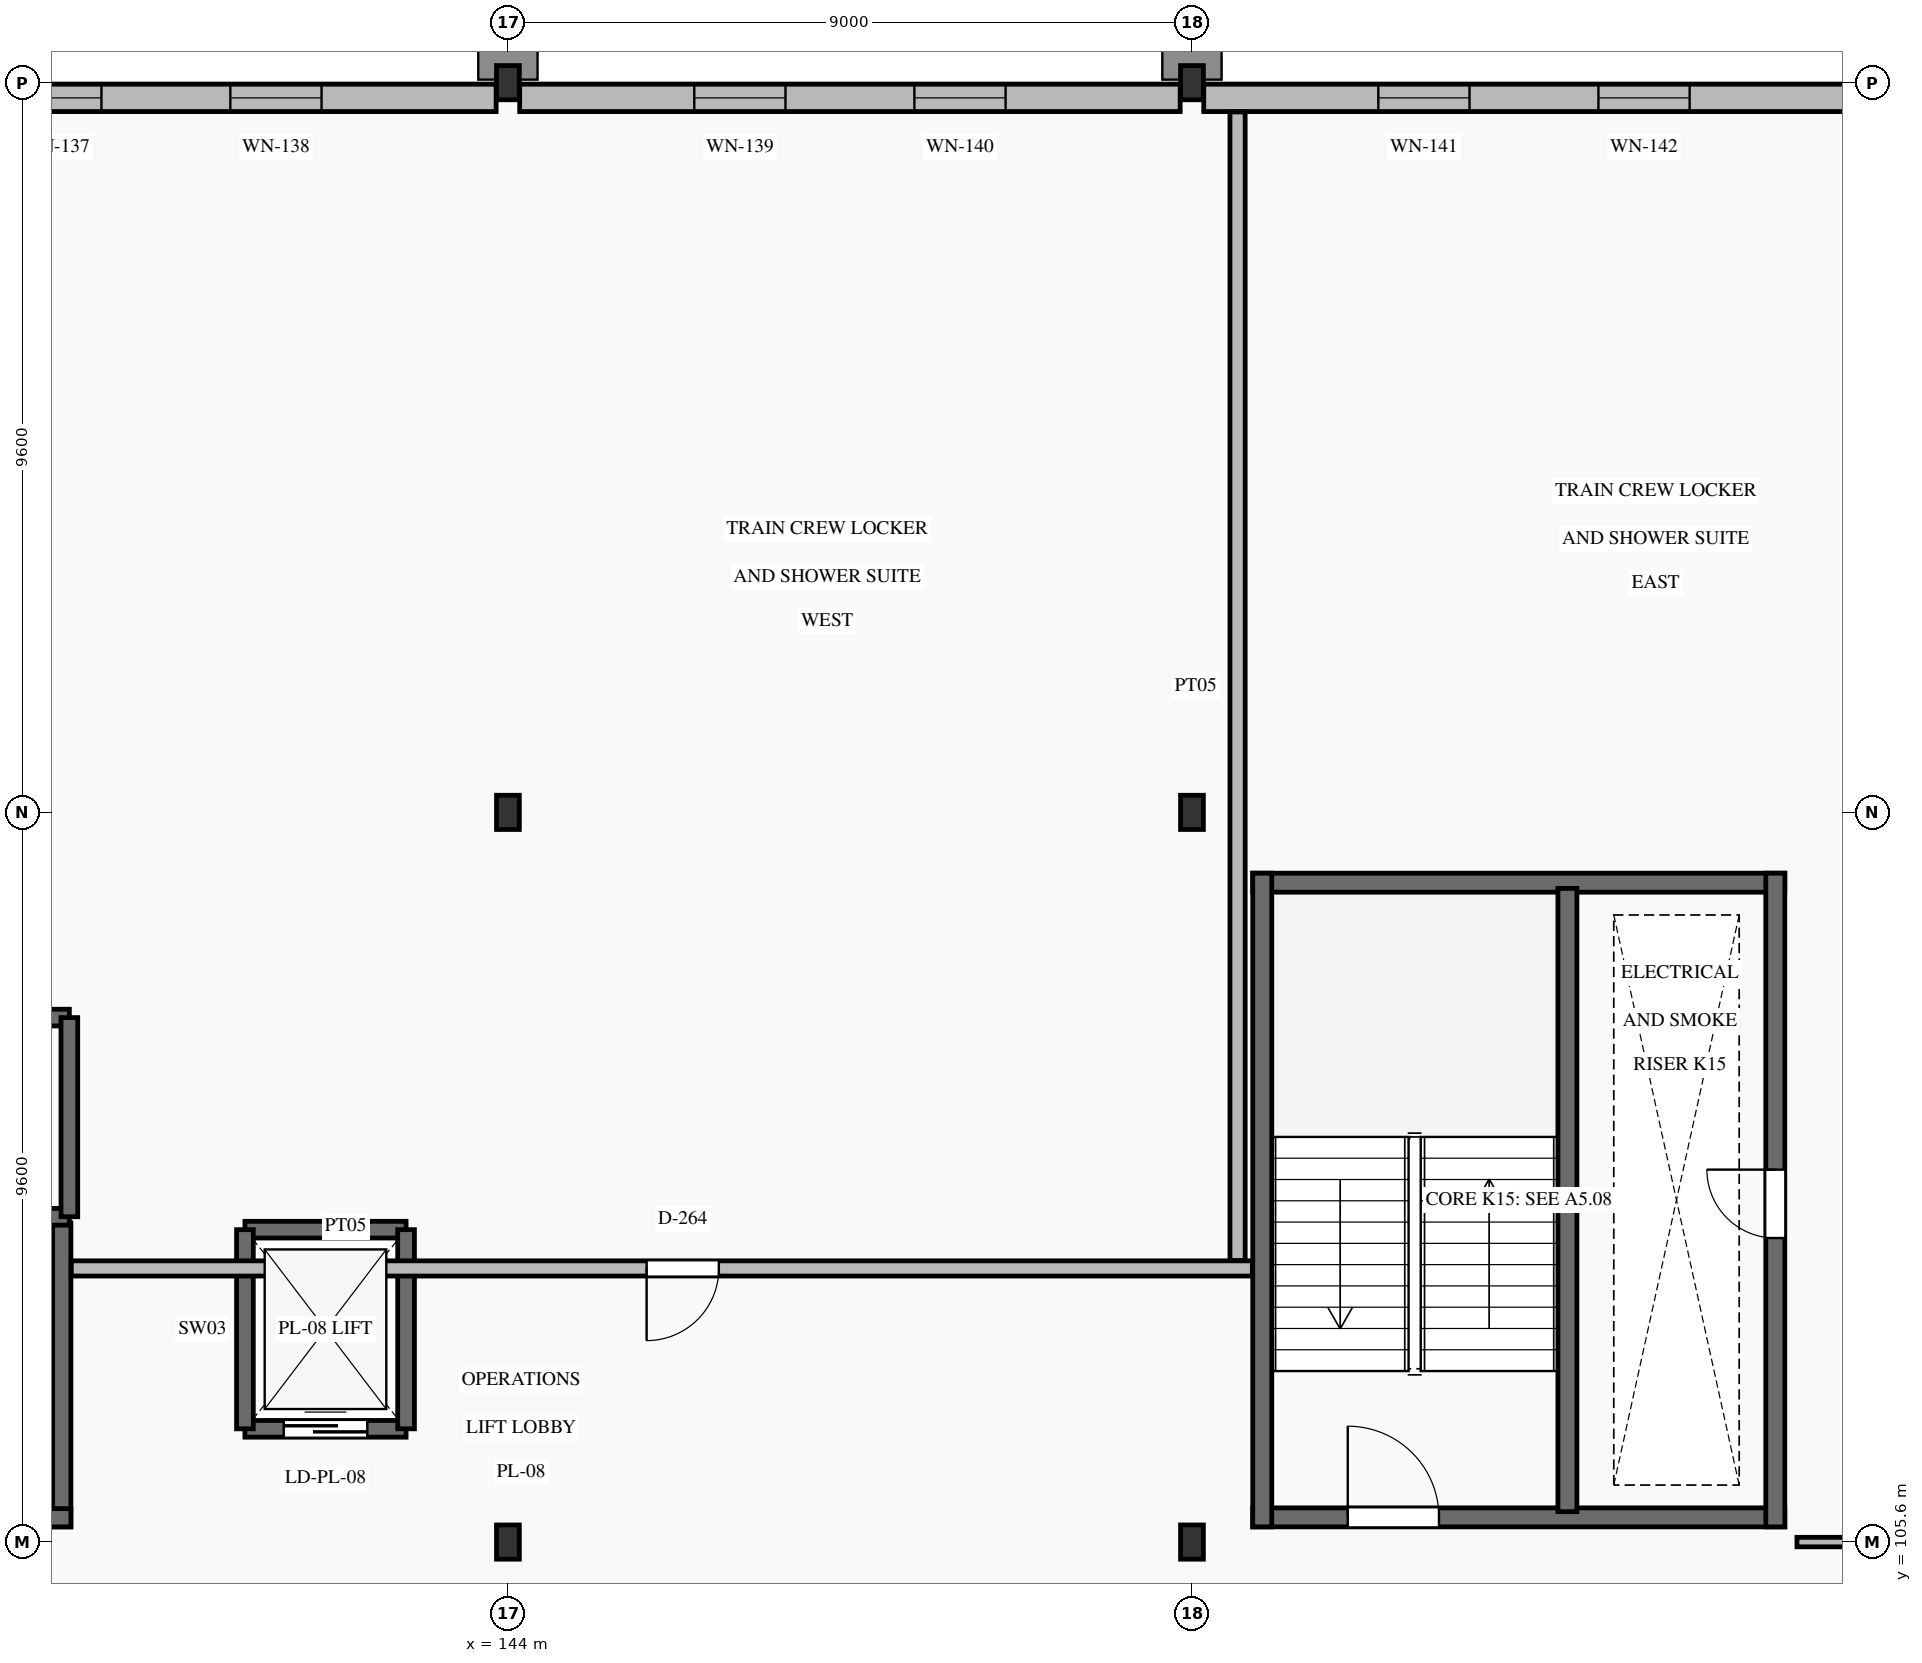
"""IFC4 building model, lengths in metres.
Left out: names, types, materials, properties, quantities, classifications, styles, units other than length and angle.
Written with IfcOpenShell. Run it as: python <this file> out.ifc"""

import sys

from ifc_helpers import new_model, si_unit, direction, frame, frame_2d, origin, origin_2d, place, context, subcontext, project, spatial, rectangle, i_section, extrude, element, fill, save


model = new_model("IFC4")
c1 = context("Model", 3, precision=1e-05, world=origin(), true_north=direction((0.0, 1.0)))
c2 = subcontext(c1, "Body", "Model", "MODEL_VIEW")
j1 = project(units=[si_unit("LENGTHUNIT", "METRE"), si_unit("PLANEANGLEUNIT", "RADIAN")], contexts=[c1])
p1 = place(None, origin())
s1 = spatial("IfcSite", under=j1, at=p1, CompositionType="ELEMENT")
p2 = place(p1, origin())
s2 = spatial("IfcBuilding", under=s1, at=p2, CompositionType="ELEMENT")
p3 = place(p2, frame((0.0, 0.0, 10.8)))
s3 = spatial("IfcBuildingStorey", under=s2, at=p3, CompositionType="ELEMENT", Elevation=10.8)
for number, where, z_axis, x_axis in (
    (1, (144.0, 105.6, 0.0), (0.0, 0.0, 1.0), (1.0, 0.0, 0.0)),
    (2, (144.0, 115.2, 0.0), (0.0, 0.0, 1.0), (1.0, 0.0, 0.0)),
    (3, (144.0, 124.8, 0.0), (0.0, 0.0, 1.0), (1.0, 0.0, 0.0)),
    (4, (153.0, 105.6, 0.0), (0.0, 0.0, 1.0), (1.0, 0.0, 0.0)),
    (5, (153.0, 115.2, 0.0), (0.0, 0.0, 1.0), (1.0, 0.0, 0.0)),
    (6, (153.0, 124.8, 0.0), (0.0, 0.0, 1.0), (1.0, 0.0, 0.0)),
):
    element("IfcColumn", number, at=place(p3, frame(where, z_axis=z_axis, x_axis=x_axis)), inside=s3, PredefinedType="COLUMN", context=c2, shape_type="SweptSolid", body=[
        extrude(i_section(OverallWidth=0.3, OverallDepth=0.45, WebThickness=0.014, FlangeThickness=0.026, FilletRadius=0.027, at=origin_2d()), origin(), (0.0, 0.0, 1.0), 4.2),
    ])
p4 = place(p3, frame((135.155, 124.6, 0.0), z_axis=(0.0, 0.0, 1.0), x_axis=(1.0, 0.0, 0.0)))
e7 = element("IfcWall", 7, at=p4, inside=s3, PredefinedType="SOLIDWALL", context=c2, shape_type="SweptSolid", body=[
    extrude(rectangle(XDim=8.69, YDim=0.36, at=frame_2d((4.345, 0.0))), origin(), (0.0, 0.0, 1.0), 3.69),
])
p5 = place(p4, frame((2.297, 0.0, 0.95)))
e8 = element("IfcOpeningElement", 8, at=p5, cuts=e7, PredefinedType="OPENING", context=c2, shape_type="SweptSolid", body=[
    extrude(rectangle(XDim=1.2, YDim=1.8, at=frame_2d((0.6, 0.9))), frame((0.0, 0.195, 0.0), z_axis=(0.0, -1.0, 0.0), x_axis=(1.0, 0.0, 0.0)), (0.0, 0.0, 1.0), 0.39),
])
p6 = place(p4, frame((5.193, 0.0, 0.95)))
e9 = element("IfcOpeningElement", 9, at=p6, cuts=e7, PredefinedType="OPENING", context=c2, shape_type="SweptSolid", body=[
    extrude(rectangle(XDim=1.2, YDim=1.8, at=frame_2d((0.6, 0.9))), frame((0.0, 0.195, 0.0), z_axis=(0.0, -1.0, 0.0), x_axis=(1.0, 0.0, 0.0)), (0.0, 0.0, 1.0), 0.39),
])
p7 = place(p3, frame((144.155, 124.6, 0.0), z_axis=(0.0, 0.0, 1.0), x_axis=(1.0, 0.0, 0.0)))
e10 = element("IfcWall", 10, at=p7, inside=s3, PredefinedType="SOLIDWALL", context=c2, shape_type="SweptSolid", body=[
    extrude(rectangle(XDim=8.69, YDim=0.36, at=frame_2d((4.345, 0.0))), origin(), (0.0, 0.0, 1.0), 3.69),
])
p8 = place(p7, frame((2.297, 0.0, 0.95)))
e11 = element("IfcOpeningElement", 11, at=p8, cuts=e10, PredefinedType="OPENING", context=c2, shape_type="SweptSolid", body=[
    extrude(rectangle(XDim=1.2, YDim=1.8, at=frame_2d((0.6, 0.9))), frame((0.0, 0.195, 0.0), z_axis=(0.0, -1.0, 0.0), x_axis=(1.0, 0.0, 0.0)), (0.0, 0.0, 1.0), 0.39),
])
p9 = place(p7, frame((5.193, 0.0, 0.95)))
e12 = element("IfcOpeningElement", 12, at=p9, cuts=e10, PredefinedType="OPENING", context=c2, shape_type="SweptSolid", body=[
    extrude(rectangle(XDim=1.2, YDim=1.8, at=frame_2d((0.6, 0.9))), frame((0.0, 0.195, 0.0), z_axis=(0.0, -1.0, 0.0), x_axis=(1.0, 0.0, 0.0)), (0.0, 0.0, 1.0), 0.39),
])
p10 = place(p3, frame((153.155, 124.6, 0.0), z_axis=(0.0, 0.0, 1.0), x_axis=(1.0, 0.0, 0.0)))
e13 = element("IfcWall", 13, at=p10, inside=s3, PredefinedType="SOLIDWALL", context=c2, shape_type="SweptSolid", body=[
    extrude(rectangle(XDim=8.69, YDim=0.36, at=frame_2d((4.345, 0.0))), origin(), (0.0, 0.0, 1.0), 3.69),
])
p11 = place(p10, frame((2.297, 0.0, 0.95)))
e14 = element("IfcOpeningElement", 14, at=p11, cuts=e13, PredefinedType="OPENING", context=c2, shape_type="SweptSolid", body=[
    extrude(rectangle(XDim=1.2, YDim=1.8, at=frame_2d((0.6, 0.9))), frame((0.0, 0.195, 0.0), z_axis=(0.0, -1.0, 0.0), x_axis=(1.0, 0.0, 0.0)), (0.0, 0.0, 1.0), 0.39),
])
p12 = place(p10, frame((5.193, 0.0, 0.95)))
e15 = element("IfcOpeningElement", 15, at=p12, cuts=e13, PredefinedType="OPENING", context=c2, shape_type="SweptSolid", body=[
    extrude(rectangle(XDim=1.2, YDim=1.8, at=frame_2d((0.6, 0.9))), frame((0.0, 0.195, 0.0), z_axis=(0.0, -1.0, 0.0), x_axis=(1.0, 0.0, 0.0)), (0.0, 0.0, 1.0), 0.39),
])
p13 = place(p3, frame((138.13, 105.8, 0.0), z_axis=(0.0, 0.0, 1.0), x_axis=(0.0, 1.0, 0.0)))
e16 = element("IfcWall", 16, at=p13, inside=s3, PredefinedType="SHEAR", context=c2, shape_type="SweptSolid", body=[
    extrude(rectangle(XDim=4.0, YDim=0.24, at=frame_2d((2.0, 0.0))), origin(), (0.0, 0.0, 1.0), 4.2),
])
p14 = place(p3, frame((134.05, 105.92, 0.0), z_axis=(0.0, 0.0, 1.0), x_axis=(1.0, 0.0, 0.0)))
e17 = element("IfcWall", 17, at=p14, inside=s3, PredefinedType="SHEAR", context=c2, shape_type="SweptSolid", body=[
    extrude(rectangle(XDim=4.2, YDim=0.24, at=frame_2d((2.1, 0.0))), origin(), (0.0, 0.0, 1.0), 4.2),
])
p15 = place(p14, frame((1.4, 0.0, 0.0)))
e18 = element("IfcOpeningElement", 18, at=p15, cuts=e17, PredefinedType="OPENING", context=c2, shape_type="SweptSolid", body=[
    extrude(rectangle(XDim=1.4, YDim=2.2, at=frame_2d((0.7, 1.1))), frame((0.0, 0.135, 0.0), z_axis=(0.0, -1.0, 0.0), x_axis=(1.0, 0.0, 0.0)), (0.0, 0.0, 1.0), 0.27),
])
p16 = place(p3, frame((153.8, 105.925, 0.0), z_axis=(0.0, 0.0, 1.0), x_axis=(1.0, 0.0, 0.0)))
e19 = element("IfcWall", 19, at=p16, inside=s3, PredefinedType="SHEAR", context=c2, shape_type="SweptSolid", body=[
    extrude(rectangle(XDim=7.0, YDim=0.25, at=frame_2d((3.5, 0.0))), origin(), (0.0, 0.0, 1.0), 4.2),
])
p17 = place(p16, frame((1.25, 0.0, 0.0)))
e20 = element("IfcOpeningElement", 20, at=p17, cuts=e19, PredefinedType="OPENING", context=c2, shape_type="SweptSolid", body=[
    extrude(rectangle(XDim=1.2, YDim=2.15, at=frame_2d((0.6, 1.075))), frame((0.0, 0.14, 0.0), z_axis=(0.0, -1.0, 0.0), x_axis=(1.0, 0.0, 0.0)), (0.0, 0.0, 1.0), 0.28),
])
p18 = place(p3, frame((153.8, 114.275, 0.0), z_axis=(0.0, 0.0, 1.0), x_axis=(1.0, 0.0, 0.0)))
e21 = element("IfcWall", 21, at=p18, inside=s3, PredefinedType="SHEAR", context=c2, shape_type="SweptSolid", body=[
    extrude(rectangle(XDim=7.0, YDim=0.25, at=frame_2d((3.5, 0.0))), origin(), (0.0, 0.0, 1.0), 4.2),
])
p19 = place(p3, frame((153.925, 105.8, 0.0), z_axis=(0.0, 0.0, 1.0), x_axis=(0.0, 1.0, 0.0)))
e22 = element("IfcWall", 22, at=p19, inside=s3, PredefinedType="SHEAR", context=c2, shape_type="SweptSolid", body=[
    extrude(rectangle(XDim=8.6, YDim=0.25, at=frame_2d((4.3, 0.0))), origin(), (0.0, 0.0, 1.0), 4.2),
])
p20 = place(p3, frame((160.675, 105.8, 0.0), z_axis=(0.0, 0.0, 1.0), x_axis=(0.0, 1.0, 0.0)))
e23 = element("IfcWall", 23, at=p20, inside=s3, PredefinedType="SHEAR", context=c2, shape_type="SweptSolid", body=[
    extrude(rectangle(XDim=8.6, YDim=0.25, at=frame_2d((4.3, 0.0))), origin(), (0.0, 0.0, 1.0), 4.2),
])
p21 = place(p20, frame((3.8, 0.0, 0.0)))
e24 = element("IfcOpeningElement", 24, at=p21, cuts=e23, PredefinedType="OPENING", context=c2, shape_type="SweptSolid", body=[
    extrude(rectangle(XDim=0.9, YDim=2.05, at=frame_2d((0.45, 1.025))), frame((0.0, 0.14, 0.0), z_axis=(0.0, -1.0, 0.0), x_axis=(1.0, 0.0, 0.0)), (0.0, 0.0, 1.0), 0.28),
])
p22 = place(p3, frame((157.94, 106.0, 0.0), z_axis=(0.0, 0.0, 1.0), x_axis=(0.0, 1.0, 0.0)))
e25 = element("IfcWall", 25, at=p22, inside=s3, PredefinedType="SHEAR", context=c2, shape_type="SweptSolid", body=[
    extrude(rectangle(XDim=8.2, YDim=0.25, at=frame_2d((4.1, 0.0))), origin(), (0.0, 0.0, 1.0), 4.2),
])
p23 = place(p3, frame((140.54, 107.09, 0.0), z_axis=(0.0, 0.0, 1.0), x_axis=(1.0, 0.0, 0.0)))
e26 = element("IfcWall", 26, at=p23, inside=s3, PredefinedType="SHEAR", context=c2, shape_type="SweptSolid", body=[
    extrude(rectangle(XDim=2.12, YDim=0.22, at=frame_2d((1.06, 0.0))), origin(), (0.0, 0.0, 1.0), 4.2),
])
p24 = place(p23, frame((0.51, 0.0, 0.0)))
e27 = element("IfcOpeningElement", 27, at=p24, cuts=e26, PredefinedType="OPENING", context=c2, shape_type="SweptSolid", body=[
    extrude(rectangle(XDim=1.1, YDim=2.15, at=frame_2d((0.55, 1.075))), frame((0.0, 0.125, 0.0), z_axis=(0.0, -1.0, 0.0), x_axis=(1.0, 0.0, 0.0)), (0.0, 0.0, 1.0), 0.25),
])
p25 = place(p3, frame((140.54, 109.71, 0.0), z_axis=(0.0, 0.0, 1.0), x_axis=(1.0, 0.0, 0.0)))
e28 = element("IfcWall", 28, at=p25, inside=s3, PredefinedType="SHEAR", context=c2, shape_type="SweptSolid", body=[
    extrude(rectangle(XDim=2.12, YDim=0.22, at=frame_2d((1.06, 0.0))), origin(), (0.0, 0.0, 1.0), 4.2),
])
for number, where, z_axis, x_axis in (
    (29, (140.54, 107.09, 0.0), (0.0, 0.0, 1.0), (0.0, 1.0, 0.0)),
    (30, (142.66, 107.09, 0.0), (0.0, 0.0, 1.0), (0.0, 1.0, 0.0)),
):
    element("IfcWall", number, at=place(p3, frame(where, z_axis=z_axis, x_axis=x_axis)), inside=s3, PredefinedType="SHEAR", context=c2, shape_type="SweptSolid", body=[
        extrude(rectangle(XDim=2.62, YDim=0.22, at=frame_2d((1.31, 0.0))), origin(), (0.0, 0.0, 1.0), 4.2),
    ])
p26 = place(p3, frame((134.07, 109.88, 0.0), z_axis=(0.0, 0.0, 1.0), x_axis=(1.0, 0.0, 0.0)))
e31 = element("IfcWall", 31, at=p26, inside=s3, PredefinedType="SHEAR", context=c2, shape_type="SweptSolid", body=[
    extrude(rectangle(XDim=4.16, YDim=0.22, at=frame_2d((2.08, 0.0))), origin(), (0.0, 0.0, 1.0), 4.2),
])
p27 = place(p26, frame((1.53, 0.0, 0.0)))
e32 = element("IfcOpeningElement", 32, at=p27, cuts=e31, PredefinedType="OPENING", context=c2, shape_type="SweptSolid", body=[
    extrude(rectangle(XDim=1.1, YDim=2.15, at=frame_2d((0.55, 1.075))), frame((0.0, 0.125, 0.0), z_axis=(0.0, -1.0, 0.0), x_axis=(1.0, 0.0, 0.0)), (0.0, 0.0, 1.0), 0.25),
])
p28 = place(p3, frame((134.07, 112.5, 0.0), z_axis=(0.0, 0.0, 1.0), x_axis=(1.0, 0.0, 0.0)))
e33 = element("IfcWall", 33, at=p28, inside=s3, PredefinedType="SHEAR", context=c2, shape_type="SweptSolid", body=[
    extrude(rectangle(XDim=4.16, YDim=0.22, at=frame_2d((2.08, 0.0))), origin(), (0.0, 0.0, 1.0), 4.2),
])
p29 = place(p3, frame((138.23, 109.88, 0.0), z_axis=(0.0, 0.0, 1.0), x_axis=(0.0, 1.0, 0.0)))
e34 = element("IfcWall", 34, at=p29, inside=s3, PredefinedType="SHEAR", context=c2, shape_type="SweptSolid", body=[
    extrude(rectangle(XDim=2.62, YDim=0.22, at=frame_2d((1.31, 0.0))), origin(), (0.0, 0.0, 1.0), 4.2),
])
p30 = place(p3, frame((138.255, 109.2, 0.0), z_axis=(0.0, 0.0, 1.0), x_axis=(1.0, 0.0, 0.0)))
e35 = element("IfcWall", 35, at=p30, inside=s3, PredefinedType="PARTITIONING", context=c2, shape_type="SweptSolid", body=[
    extrude(rectangle(XDim=15.54, YDim=0.2, at=frame_2d((7.77, 0.0))), origin(), (0.0, 0.0, 1.0), 3.94),
])
p31 = place(p30, frame((7.57, 0.0, 0.0)))
e36 = element("IfcOpeningElement", 36, at=p31, cuts=e35, PredefinedType="OPENING", context=c2, shape_type="SweptSolid", body=[
    extrude(rectangle(XDim=0.95, YDim=2.1, at=frame_2d((0.475, 1.05))), frame((0.0, 0.115, 0.0), z_axis=(0.0, -1.0, 0.0), x_axis=(1.0, 0.0, 0.0)), (0.0, 0.0, 1.0), 0.23),
])
p32 = place(p3, frame((160.96, 105.6, 0.0), z_axis=(0.0, 0.0, 1.0), x_axis=(1.0, 0.0, 0.0)))
e37 = element("IfcWall", 37, at=p32, inside=s3, PredefinedType="PARTITIONING", context=c2, shape_type="SweptSolid", body=[
    extrude(rectangle(XDim=5.89, YDim=0.125, at=frame_2d((2.945, 0.0))), origin(), (0.0, 0.0, 1.0), 3.5),
])
p33 = place(p32, frame((3.17, 0.0, 0.0)))
e38 = element("IfcOpeningElement", 38, at=p33, cuts=e37, PredefinedType="OPENING", context=c2, shape_type="SweptSolid", body=[
    extrude(rectangle(XDim=0.95, YDim=2.1, at=frame_2d((0.475, 1.05))), frame((0.0, 0.077, 0.0), z_axis=(0.0, -1.0, 0.0), x_axis=(1.0, 0.0, 0.0)), (0.0, 0.0, 1.0), 0.155),
])
p34 = place(p3, frame((153.6, 109.305, 0.0), z_axis=(0.0, 0.0, 1.0), x_axis=(0.0, 1.0, 0.0)))
e39 = element("IfcWall", 39, at=p34, inside=s3, PredefinedType="PARTITIONING", context=c2, shape_type="SweptSolid", body=[
    extrude(rectangle(XDim=15.11, YDim=0.2, at=frame_2d((7.555, 0.0))), origin(), (0.0, 0.0, 1.0), 3.94),
])
p35 = place(p5, origin())
e40 = element("IfcWindow", 40, at=p35, inside=s3, PartitioningType="SINGLE_PANEL", PredefinedType="WINDOW", context=c2, shape_type="SweptSolid", body=[
    extrude(rectangle(XDim=1.2, YDim=1.8, at=frame_2d((0.6, 0.9))), frame((0.0, 0.03, 0.0), z_axis=(0.0, -1.0, 0.0), x_axis=(1.0, 0.0, 0.0)), (0.0, 0.0, 1.0), 0.06),
])
fill(e8, e40)
p36 = place(p6, origin())
e41 = element("IfcWindow", 41, at=p36, inside=s3, PartitioningType="SINGLE_PANEL", PredefinedType="WINDOW", context=c2, shape_type="SweptSolid", body=[
    extrude(rectangle(XDim=1.2, YDim=1.8, at=frame_2d((0.6, 0.9))), frame((0.0, 0.03, 0.0), z_axis=(0.0, -1.0, 0.0), x_axis=(1.0, 0.0, 0.0)), (0.0, 0.0, 1.0), 0.06),
])
fill(e9, e41)
p37 = place(p8, origin())
e42 = element("IfcWindow", 42, at=p37, inside=s3, PartitioningType="SINGLE_PANEL", PredefinedType="WINDOW", context=c2, shape_type="SweptSolid", body=[
    extrude(rectangle(XDim=1.2, YDim=1.8, at=frame_2d((0.6, 0.9))), frame((0.0, 0.03, 0.0), z_axis=(0.0, -1.0, 0.0), x_axis=(1.0, 0.0, 0.0)), (0.0, 0.0, 1.0), 0.06),
])
fill(e11, e42)
p38 = place(p9, origin())
e43 = element("IfcWindow", 43, at=p38, inside=s3, PartitioningType="SINGLE_PANEL", PredefinedType="WINDOW", context=c2, shape_type="SweptSolid", body=[
    extrude(rectangle(XDim=1.2, YDim=1.8, at=frame_2d((0.6, 0.9))), frame((0.0, 0.03, 0.0), z_axis=(0.0, -1.0, 0.0), x_axis=(1.0, 0.0, 0.0)), (0.0, 0.0, 1.0), 0.06),
])
fill(e12, e43)
p39 = place(p11, origin())
e44 = element("IfcWindow", 44, at=p39, inside=s3, PartitioningType="SINGLE_PANEL", PredefinedType="WINDOW", context=c2, shape_type="SweptSolid", body=[
    extrude(rectangle(XDim=1.2, YDim=1.8, at=frame_2d((0.6, 0.9))), frame((0.0, 0.03, 0.0), z_axis=(0.0, -1.0, 0.0), x_axis=(1.0, 0.0, 0.0)), (0.0, 0.0, 1.0), 0.06),
])
fill(e14, e44)
p40 = place(p12, origin())
e45 = element("IfcWindow", 45, at=p40, inside=s3, PartitioningType="SINGLE_PANEL", PredefinedType="WINDOW", context=c2, shape_type="SweptSolid", body=[
    extrude(rectangle(XDim=1.2, YDim=1.8, at=frame_2d((0.6, 0.9))), frame((0.0, 0.03, 0.0), z_axis=(0.0, -1.0, 0.0), x_axis=(1.0, 0.0, 0.0)), (0.0, 0.0, 1.0), 0.06),
])
fill(e15, e45)
p41 = place(p17, origin())
e46 = element("IfcDoor", 46, at=p41, inside=s3, OperationType="SINGLE_SWING_LEFT", PredefinedType="DOOR", context=c2, shape_type="SweptSolid", body=[
    extrude(rectangle(XDim=1.2, YDim=2.15, at=frame_2d((0.6, 1.075))), frame((0.0, 0.025, 0.0), z_axis=(0.0, -1.0, 0.0), x_axis=(1.0, 0.0, 0.0)), (0.0, 0.0, 1.0), 0.05),
])
fill(e20, e46)
p42 = place(p21, origin())
e47 = element("IfcDoor", 47, at=p42, inside=s3, OperationType="SINGLE_SWING_RIGHT", PredefinedType="DOOR", context=c2, shape_type="SweptSolid", body=[
    extrude(rectangle(XDim=0.9, YDim=2.05, at=frame_2d((0.45, 1.025))), frame((0.0, 0.025, 0.0), z_axis=(0.0, -1.0, 0.0), x_axis=(1.0, 0.0, 0.0)), (0.0, 0.0, 1.0), 0.05),
])
fill(e24, e47)
p43 = place(p24, origin())
e48 = element("IfcDoor", 48, at=p43, inside=s3, OperationType="SLIDING_TO_LEFT", PredefinedType="DOOR", context=c2, shape_type="SweptSolid", body=[
    extrude(rectangle(XDim=1.1, YDim=2.15, at=frame_2d((0.55, 1.075))), frame((0.0, 0.025, 0.0), z_axis=(0.0, -1.0, 0.0), x_axis=(1.0, 0.0, 0.0)), (0.0, 0.0, 1.0), 0.05),
])
fill(e27, e48)
p44 = place(p31, frame((0.95, 0.0, 0.0), z_axis=(0.0, 0.0, 1.0), x_axis=(-1.0, 0.0, 0.0)))
e49 = element("IfcDoor", 49, at=p44, inside=s3, OperationType="SINGLE_SWING_LEFT", PredefinedType="DOOR", context=c2, shape_type="SweptSolid", body=[
    extrude(rectangle(XDim=0.95, YDim=2.1, at=frame_2d((0.475, 1.05))), frame((0.0, 0.025, 0.0), z_axis=(0.0, -1.0, 0.0), x_axis=(1.0, 0.0, 0.0)), (0.0, 0.0, 1.0), 0.05),
])
fill(e36, e49)
save(model, sys.argv[1])
